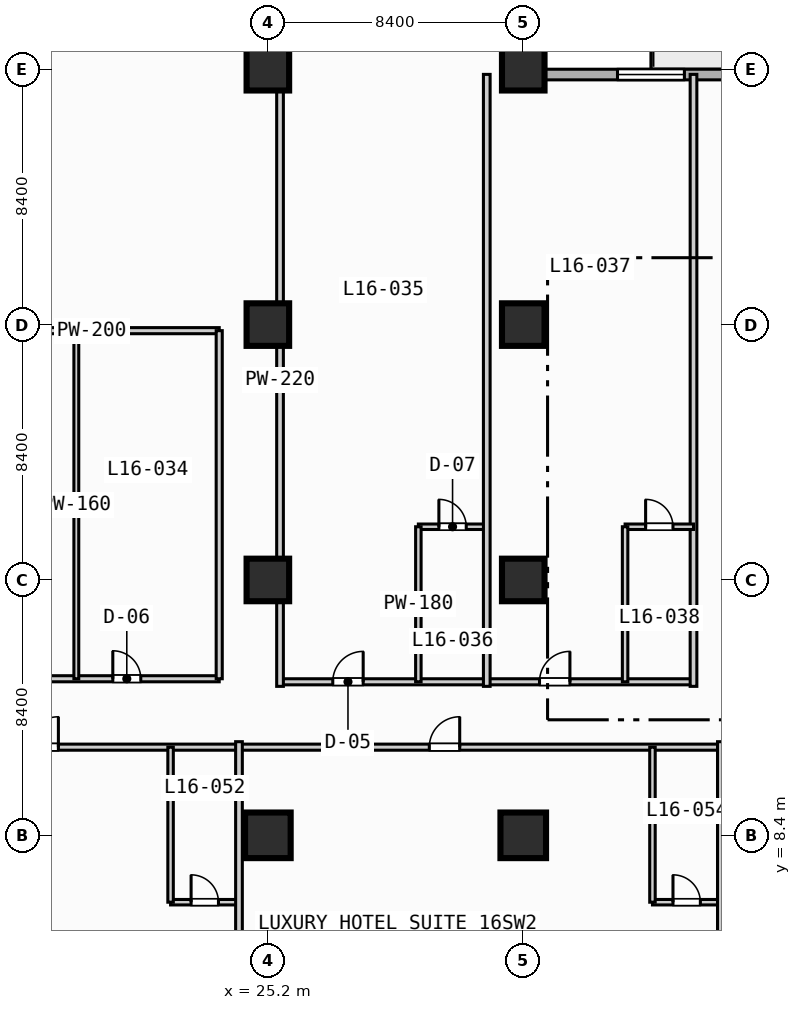
"""IFC4 building model, lengths in metres.
Left out: names, types, materials, properties, quantities, classifications, styles, units other than length and angle.
Written with IfcOpenShell. Run it as: python <this file> out.ifc"""

import sys

from ifc_helpers import new_model, si_unit, direction, frame, frame_2d, origin, origin_2d, place, context, subcontext, project, spatial, rectangle, extrude, element, fill, save


model = new_model("IFC4")
c1 = context("Model", 3, precision=1e-05, world=origin(), true_north=direction((0.0, 1.0)))
c2 = subcontext(c1, "Body", "Model", "MODEL_VIEW")
j1 = project(units=[si_unit("LENGTHUNIT", "METRE"), si_unit("PLANEANGLEUNIT", "RADIAN")], contexts=[c1])
p1 = place(None, origin())
s1 = spatial("IfcSite", under=j1, at=p1, CompositionType="ELEMENT")
p2 = place(p1, origin())
s2 = spatial("IfcBuilding", under=s1, at=p2, CompositionType="ELEMENT")
p3 = place(p2, frame((0.0, 0.0, 70.0)))
s3 = spatial("IfcBuildingStorey", under=s2, at=p3, CompositionType="ELEMENT", Elevation=70.0)
p4 = place(p3, frame((25.2, 8.4, 0.0), z_axis=(0.0, 0.0, 1.0), x_axis=(1.0, 0.0, 0.0)))
e1 = element("IfcColumn", 1, at=p4, inside=s3, PredefinedType="COLUMN", context=c2, shape_type="SweptSolid", body=[
    extrude(rectangle(XDim=1.5, YDim=1.5, at=origin_2d()), origin(), (0.0, 0.0, 1.0), 3.8),
])
for number, where, z_axis, x_axis in (
    (2, (25.2, 16.8, 0.0), (0.0, 0.0, 1.0), (1.0, 0.0, 0.0)),
    (3, (25.2, 25.2, 0.0), (0.0, 0.0, 1.0), (1.0, 0.0, 0.0)),
    (4, (25.2, 33.6, 0.0), (0.0, 0.0, 1.0), (1.0, 0.0, 0.0)),
):
    element("IfcColumn", number, at=place(p3, frame(where, z_axis=z_axis, x_axis=x_axis)), inside=s3, PredefinedType="COLUMN", context=c2, shape_type="SweptSolid", body=[
        extrude(rectangle(XDim=1.4, YDim=1.4, at=origin_2d()), origin(), (0.0, 0.0, 1.0), 3.8),
    ])
p5 = place(p3, frame((33.6, 8.4, 0.0), z_axis=(0.0, 0.0, 1.0), x_axis=(1.0, 0.0, 0.0)))
e5 = element("IfcColumn", 5, at=p5, inside=s3, PredefinedType="COLUMN", context=c2, shape_type="SweptSolid", body=[
    extrude(rectangle(XDim=1.5, YDim=1.5, at=origin_2d()), origin(), (0.0, 0.0, 1.0), 3.8),
])
for number, where, z_axis, x_axis in (
    (6, (33.6, 16.8, 0.0), (0.0, 0.0, 1.0), (1.0, 0.0, 0.0)),
    (7, (33.6, 25.2, 0.0), (0.0, 0.0, 1.0), (1.0, 0.0, 0.0)),
    (8, (33.6, 33.6, 0.0), (0.0, 0.0, 1.0), (1.0, 0.0, 0.0)),
):
    element("IfcColumn", number, at=place(p3, frame(where, z_axis=z_axis, x_axis=x_axis)), inside=s3, PredefinedType="COLUMN", context=c2, shape_type="SweptSolid", body=[
        extrude(rectangle(XDim=1.4, YDim=1.4, at=origin_2d()), origin(), (0.0, 0.0, 1.0), 3.8),
    ])
p6 = place(p3, frame((33.425, 89.225, 0.0), z_axis=(0.0, 0.0, 1.0), x_axis=(0.0, -1.0, 0.0)))
e9 = element("IfcWall", 9, at=p6, inside=s3, PredefinedType="STANDARD", context=c2, shape_type="SweptSolid", body=[
    extrude(rectangle(XDim=55.8, YDim=0.35, at=frame_2d((27.9, 0.0))), origin(), (0.0, 0.0, 1.0), 3.55),
])
p7 = place(p6, frame((16.725, 0.0, 0.85)))
e10 = element("IfcOpeningElement", 10, at=p7, cuts=e9, PredefinedType="OPENING", context=c2, shape_type="SweptSolid", body=[
    extrude(rectangle(XDim=2.2, YDim=1.8, at=frame_2d((1.1, 0.9))), frame((0.0, 0.185, 0.0), z_axis=(0.0, -1.0, 0.0), x_axis=(1.0, 0.0, 0.0)), (0.0, 0.0, 1.0), 0.37),
])
p8 = place(p6, frame((8.325, 0.0, 0.85)))
e11 = element("IfcOpeningElement", 11, at=p8, cuts=e9, PredefinedType="OPENING", context=c2, shape_type="SweptSolid", body=[
    extrude(rectangle(XDim=2.2, YDim=1.8, at=frame_2d((1.1, 0.9))), frame((0.0, 0.185, 0.0), z_axis=(0.0, -1.0, 0.0), x_axis=(1.0, 0.0, 0.0)), (0.0, 0.0, 1.0), 0.37),
])
p9 = place(p3, frame((33.425, 33.425, 0.0), z_axis=(0.0, 0.0, 1.0), x_axis=(1.0, 0.0, 0.0)))
e12 = element("IfcWall", 12, at=p9, inside=s3, PredefinedType="STANDARD", context=c2, shape_type="SweptSolid", body=[
    extrude(rectangle(XDim=55.8, YDim=0.35, at=frame_2d((27.9, 0.0))), origin(), (0.0, 0.0, 1.0), 3.55),
])
p10 = place(p9, frame((12.075, 0.0, 0.0)))
e13 = element("IfcOpeningElement", 13, at=p10, cuts=e12, PredefinedType="OPENING", context=c2, shape_type="SweptSolid", body=[
    extrude(rectangle(XDim=1.4, YDim=2.2, at=frame_2d((0.7, 1.1))), frame((0.0, 0.185, 0.0), z_axis=(0.0, -1.0, 0.0), x_axis=(1.0, 0.0, 0.0)), (0.0, 0.0, 1.0), 0.37),
])
p11 = place(p9, frame((3.275, 0.0, 0.85)))
e14 = element("IfcOpeningElement", 14, at=p11, cuts=e12, PredefinedType="OPENING", context=c2, shape_type="SweptSolid", body=[
    extrude(rectangle(XDim=2.2, YDim=1.8, at=frame_2d((1.1, 0.9))), frame((0.0, 0.185, 0.0), z_axis=(0.0, -1.0, 0.0), x_axis=(1.0, 0.0, 0.0)), (0.0, 0.0, 1.0), 0.37),
])
p12 = place(p9, frame((36.875, 0.0, 0.85)))
e15 = element("IfcOpeningElement", 15, at=p12, cuts=e12, PredefinedType="OPENING", context=c2, shape_type="SweptSolid", body=[
    extrude(rectangle(XDim=2.2, YDim=1.8, at=frame_2d((1.1, 0.9))), frame((0.0, 0.185, 0.0), z_axis=(0.0, -1.0, 0.0), x_axis=(1.0, 0.0, 0.0)), (0.0, 0.0, 1.0), 0.37),
])
p13 = place(p9, frame((45.275, 0.0, 0.85)))
e16 = element("IfcOpeningElement", 16, at=p13, cuts=e12, PredefinedType="OPENING", context=c2, shape_type="SweptSolid", body=[
    extrude(rectangle(XDim=2.2, YDim=1.8, at=frame_2d((1.1, 0.9))), frame((0.0, 0.185, 0.0), z_axis=(0.0, -1.0, 0.0), x_axis=(1.0, 0.0, 0.0)), (0.0, 0.0, 1.0), 0.37),
])
p14 = place(p3, frame((13.7, 13.55, 0.0), z_axis=(0.0, 0.0, 1.0), x_axis=(1.0, 0.0, 0.0)))
e17 = element("IfcWall", 17, at=p14, inside=s3, PredefinedType="PARTITIONING", context=c2, shape_type="SweptSolid", body=[
    extrude(rectangle(XDim=9.9, YDim=0.2, at=frame_2d((4.95, 0.0))), origin(), (0.0, 0.0, 1.0), 3.55),
])
p15 = place(p14, frame((1.2, 0.0, 0.0)))
e18 = element("IfcOpeningElement", 18, at=p15, cuts=e17, PredefinedType="OPENING", context=c2, shape_type="SweptSolid", body=[
    extrude(rectangle(XDim=0.92, YDim=2.1, at=frame_2d((0.46, 1.05))), frame((0.0, 0.11, 0.0), z_axis=(0.0, -1.0, 0.0), x_axis=(1.0, 0.0, 0.0)), (0.0, 0.0, 1.0), 0.22),
])
p16 = place(p14, frame((6.4, 0.0, 0.0)))
e19 = element("IfcOpeningElement", 19, at=p16, cuts=e17, PredefinedType="OPENING", context=c2, shape_type="SweptSolid", body=[
    extrude(rectangle(XDim=0.92, YDim=2.1, at=frame_2d((0.46, 1.05))), frame((0.0, 0.11, 0.0), z_axis=(0.0, -1.0, 0.0), x_axis=(1.0, 0.0, 0.0)), (0.0, 0.0, 1.0), 0.22),
])
p17 = place(p3, frame((18.9, 13.55, 0.0), z_axis=(0.0, 0.0, 1.0), x_axis=(0.0, 1.0, 0.0)))
e20 = element("IfcWall", 20, at=p17, inside=s3, PredefinedType="PARTITIONING", context=c2, shape_type="SweptSolid", body=[
    extrude(rectangle(XDim=11.45, YDim=0.16, at=frame_2d((5.725, 0.0))), origin(), (0.0, 0.0, 1.0), 3.55),
])
p18 = place(p3, frame((13.7, 25.0, 0.0), z_axis=(0.0, 0.0, 1.0), x_axis=(1.0, 0.0, 0.0)))
e21 = element("IfcWall", 21, at=p18, inside=s3, PredefinedType="PARTITIONING", context=c2, shape_type="SweptSolid", body=[
    extrude(rectangle(XDim=9.9, YDim=0.2, at=frame_2d((4.95, 0.0))), origin(), (0.0, 0.0, 1.0), 2.8),
])
p19 = place(p3, frame((23.6, 13.55, 0.0), z_axis=(0.0, 0.0, 1.0), x_axis=(0.0, 1.0, 0.0)))
e22 = element("IfcWall", 22, at=p19, inside=s3, PredefinedType="PARTITIONING", context=c2, shape_type="SweptSolid", body=[
    extrude(rectangle(XDim=11.45, YDim=0.2, at=frame_2d((5.725, 0.0))), origin(), (0.0, 0.0, 1.0), 3.55),
])
p20 = place(p3, frame((25.6, 13.45, 0.0), z_axis=(0.0, 0.0, 1.0), x_axis=(1.0, 0.0, 0.0)))
e23 = element("IfcWall", 23, at=p20, inside=s3, PredefinedType="PARTITIONING", context=c2, shape_type="SweptSolid", body=[
    extrude(rectangle(XDim=13.6, YDim=0.2, at=frame_2d((6.8, 0.0))), origin(), (0.0, 0.0, 1.0), 3.55),
])
p21 = place(p20, frame((1.735, 0.0, 0.0)))
e24 = element("IfcOpeningElement", 24, at=p21, cuts=e23, PredefinedType="OPENING", context=c2, shape_type="SweptSolid", body=[
    extrude(rectangle(XDim=1.0, YDim=2.15, at=frame_2d((0.5, 1.075))), frame((0.0, 0.11, 0.0), z_axis=(0.0, -1.0, 0.0), x_axis=(1.0, 0.0, 0.0)), (0.0, 0.0, 1.0), 0.22),
])
p22 = place(p20, frame((8.535, 0.0, 0.0)))
e25 = element("IfcOpeningElement", 25, at=p22, cuts=e23, PredefinedType="OPENING", context=c2, shape_type="SweptSolid", body=[
    extrude(rectangle(XDim=1.0, YDim=2.15, at=frame_2d((0.5, 1.075))), frame((0.0, 0.11, 0.0), z_axis=(0.0, -1.0, 0.0), x_axis=(1.0, 0.0, 0.0)), (0.0, 0.0, 1.0), 0.22),
])
p23 = place(p3, frame((25.6, 13.3, 0.0), z_axis=(0.0, 0.0, 1.0), x_axis=(0.0, 1.0, 0.0)))
e26 = element("IfcWall", 26, at=p23, inside=s3, PredefinedType="PARTITIONING", context=c2, shape_type="SweptSolid", body=[
    extrude(rectangle(XDim=20.13, YDim=0.22, at=frame_2d((10.065, 0.0))), origin(), (0.0, 0.0, 1.0), 3.55),
])
p24 = place(p3, frame((30.15, 18.55, 0.0), z_axis=(0.0, 0.0, 1.0), x_axis=(1.0, 0.0, 0.0)))
e27 = element("IfcWall", 27, at=p24, inside=s3, PredefinedType="PLUMBINGWALL", context=c2, shape_type="SweptSolid", body=[
    extrude(rectangle(XDim=2.25, YDim=0.18, at=frame_2d((1.125, 0.0))), origin(), (0.0, 0.0, 1.0), 3.55),
])
p25 = place(p24, frame((0.675, 0.0, 0.0)))
e28 = element("IfcOpeningElement", 28, at=p25, cuts=e27, PredefinedType="OPENING", context=c2, shape_type="SweptSolid", body=[
    extrude(rectangle(XDim=0.9, YDim=2.1, at=frame_2d((0.45, 1.05))), frame((0.0, 0.1, 0.0), z_axis=(0.0, -1.0, 0.0), x_axis=(1.0, 0.0, 0.0)), (0.0, 0.0, 1.0), 0.2),
])
p26 = place(p3, frame((30.15, 13.45, 0.0), z_axis=(0.0, 0.0, 1.0), x_axis=(0.0, 1.0, 0.0)))
e29 = element("IfcWall", 29, at=p26, inside=s3, PredefinedType="PLUMBINGWALL", context=c2, shape_type="SweptSolid", body=[
    extrude(rectangle(XDim=5.1, YDim=0.18, at=frame_2d((2.55, 0.0))), origin(), (0.0, 0.0, 1.0), 3.55),
])
for number, where, z_axis, x_axis in (
    (30, (32.4, 13.3, 0.0), (0.0, 0.0, 1.0), (0.0, 1.0, 0.0)),
    (31, (39.2, 13.3, 0.0), (0.0, 0.0, 1.0), (0.0, 1.0, 0.0)),
):
    element("IfcWall", number, at=place(p3, frame(where, z_axis=z_axis, x_axis=x_axis)), inside=s3, PredefinedType="PARTITIONING", context=c2, shape_type="SweptSolid", body=[
        extrude(rectangle(XDim=20.13, YDim=0.22, at=frame_2d((10.065, 0.0))), origin(), (0.0, 0.0, 1.0), 3.55),
    ])
p27 = place(p3, frame((36.95, 18.55, 0.0), z_axis=(0.0, 0.0, 1.0), x_axis=(1.0, 0.0, 0.0)))
e32 = element("IfcWall", 32, at=p27, inside=s3, PredefinedType="PLUMBINGWALL", context=c2, shape_type="SweptSolid", body=[
    extrude(rectangle(XDim=2.25, YDim=0.18, at=frame_2d((1.125, 0.0))), origin(), (0.0, 0.0, 1.0), 3.55),
])
p28 = place(p27, frame((0.675, 0.0, 0.0)))
e33 = element("IfcOpeningElement", 33, at=p28, cuts=e32, PredefinedType="OPENING", context=c2, shape_type="SweptSolid", body=[
    extrude(rectangle(XDim=0.9, YDim=2.1, at=frame_2d((0.45, 1.05))), frame((0.0, 0.1, 0.0), z_axis=(0.0, -1.0, 0.0), x_axis=(1.0, 0.0, 0.0)), (0.0, 0.0, 1.0), 0.2),
])
p29 = place(p3, frame((36.95, 13.45, 0.0), z_axis=(0.0, 0.0, 1.0), x_axis=(0.0, 1.0, 0.0)))
e34 = element("IfcWall", 34, at=p29, inside=s3, PredefinedType="PLUMBINGWALL", context=c2, shape_type="SweptSolid", body=[
    extrude(rectangle(XDim=5.1, YDim=0.18, at=frame_2d((2.55, 0.0))), origin(), (0.0, 0.0, 1.0), 3.55),
])
p30 = place(p3, frame((13.7, 11.3, 0.0), z_axis=(0.0, 0.0, 1.0), x_axis=(1.0, 0.0, 0.0)))
e35 = element("IfcWall", 35, at=p30, inside=s3, PredefinedType="PARTITIONING", context=c2, shape_type="SweptSolid", body=[
    extrude(rectangle(XDim=50.1, YDim=0.2, at=frame_2d((25.05, 0.0))), origin(), (0.0, 0.0, 1.0), 3.55),
])
p31 = place(p30, frame((3.61, 0.0, 0.0)))
e36 = element("IfcOpeningElement", 36, at=p31, cuts=e35, PredefinedType="OPENING", context=c2, shape_type="SweptSolid", body=[
    extrude(rectangle(XDim=1.0, YDim=2.15, at=frame_2d((0.5, 1.075))), frame((0.0, 0.11, 0.0), z_axis=(0.0, -1.0, 0.0), x_axis=(1.0, 0.0, 0.0)), (0.0, 0.0, 1.0), 0.22),
])
p32 = place(p30, frame((16.81, 0.0, 0.0)))
e37 = element("IfcOpeningElement", 37, at=p32, cuts=e35, PredefinedType="OPENING", context=c2, shape_type="SweptSolid", body=[
    extrude(rectangle(XDim=1.0, YDim=2.15, at=frame_2d((0.5, 1.075))), frame((0.0, 0.11, 0.0), z_axis=(0.0, -1.0, 0.0), x_axis=(1.0, 0.0, 0.0)), (0.0, 0.0, 1.0), 0.22),
])
p33 = place(p30, frame((31.935, 0.0, 0.0)))
e38 = element("IfcOpeningElement", 38, at=p33, cuts=e35, PredefinedType="OPENING", context=c2, shape_type="SweptSolid", body=[
    extrude(rectangle(XDim=1.0, YDim=2.15, at=frame_2d((0.5, 1.075))), frame((0.0, 0.11, 0.0), z_axis=(0.0, -1.0, 0.0), x_axis=(1.0, 0.0, 0.0)), (0.0, 0.0, 1.0), 0.22),
])
p34 = place(p30, frame((43.785, 0.0, 0.0)))
e39 = element("IfcOpeningElement", 39, at=p34, cuts=e35, PredefinedType="OPENING", context=c2, shape_type="SweptSolid", body=[
    extrude(rectangle(XDim=1.0, YDim=2.15, at=frame_2d((0.5, 1.075))), frame((0.0, 0.11, 0.0), z_axis=(0.0, -1.0, 0.0), x_axis=(1.0, 0.0, 0.0)), (0.0, 0.0, 1.0), 0.22),
])
p35 = place(p3, frame((22.0, 6.2, 0.0), z_axis=(0.0, 0.0, 1.0), x_axis=(1.0, 0.0, 0.0)))
e40 = element("IfcWall", 40, at=p35, inside=s3, PredefinedType="PLUMBINGWALL", context=c2, shape_type="SweptSolid", body=[
    extrude(rectangle(XDim=2.25, YDim=0.18, at=frame_2d((1.125, 0.0))), origin(), (0.0, 0.0, 1.0), 3.55),
])
p36 = place(p35, frame((0.675, 0.0, 0.0)))
e41 = element("IfcOpeningElement", 41, at=p36, cuts=e40, PredefinedType="OPENING", context=c2, shape_type="SweptSolid", body=[
    extrude(rectangle(XDim=0.9, YDim=2.1, at=frame_2d((0.45, 1.05))), frame((0.0, 0.1, 0.0), z_axis=(0.0, -1.0, 0.0), x_axis=(1.0, 0.0, 0.0)), (0.0, 0.0, 1.0), 0.2),
])
p37 = place(p3, frame((22.0, 6.2, 0.0), z_axis=(0.0, 0.0, 1.0), x_axis=(0.0, 1.0, 0.0)))
e42 = element("IfcWall", 42, at=p37, inside=s3, PredefinedType="PLUMBINGWALL", context=c2, shape_type="SweptSolid", body=[
    extrude(rectangle(XDim=5.1, YDim=0.18, at=frame_2d((2.55, 0.0))), origin(), (0.0, 0.0, 1.0), 3.55),
])
p38 = place(p3, frame((24.25, 0.2, 0.0), z_axis=(0.0, 0.0, 1.0), x_axis=(0.0, 1.0, 0.0)))
e43 = element("IfcWall", 43, at=p38, inside=s3, PredefinedType="PARTITIONING", context=c2, shape_type="SweptSolid", body=[
    extrude(rectangle(XDim=11.28, YDim=0.22, at=frame_2d((5.64, 0.0))), origin(), (0.0, 0.0, 1.0), 3.55),
])
p39 = place(p3, frame((37.85, 6.2, 0.0), z_axis=(0.0, 0.0, 1.0), x_axis=(1.0, 0.0, 0.0)))
e44 = element("IfcWall", 44, at=p39, inside=s3, PredefinedType="PLUMBINGWALL", context=c2, shape_type="SweptSolid", body=[
    extrude(rectangle(XDim=2.25, YDim=0.18, at=frame_2d((1.125, 0.0))), origin(), (0.0, 0.0, 1.0), 3.55),
])
p40 = place(p39, frame((0.675, 0.0, 0.0)))
e45 = element("IfcOpeningElement", 45, at=p40, cuts=e44, PredefinedType="OPENING", context=c2, shape_type="SweptSolid", body=[
    extrude(rectangle(XDim=0.9, YDim=2.1, at=frame_2d((0.45, 1.05))), frame((0.0, 0.1, 0.0), z_axis=(0.0, -1.0, 0.0), x_axis=(1.0, 0.0, 0.0)), (0.0, 0.0, 1.0), 0.2),
])
p41 = place(p3, frame((37.85, 6.2, 0.0), z_axis=(0.0, 0.0, 1.0), x_axis=(0.0, 1.0, 0.0)))
e46 = element("IfcWall", 46, at=p41, inside=s3, PredefinedType="PLUMBINGWALL", context=c2, shape_type="SweptSolid", body=[
    extrude(rectangle(XDim=5.1, YDim=0.18, at=frame_2d((2.55, 0.0))), origin(), (0.0, 0.0, 1.0), 3.55),
])
p42 = place(p3, frame((40.1, 0.2, 0.0), z_axis=(0.0, 0.0, 1.0), x_axis=(0.0, 1.0, 0.0)))
e47 = element("IfcWall", 47, at=p42, inside=s3, PredefinedType="PARTITIONING", context=c2, shape_type="SweptSolid", body=[
    extrude(rectangle(XDim=11.28, YDim=0.22, at=frame_2d((5.64, 0.0))), origin(), (0.0, 0.0, 1.0), 3.55),
])
p43 = place(p11, origin())
e48 = element("IfcWindow", 48, at=p43, inside=s3, PartitioningType="SINGLE_PANEL", PredefinedType="WINDOW", context=c2, shape_type="SweptSolid", body=[
    extrude(rectangle(XDim=2.2, YDim=1.8, at=frame_2d((1.1, 0.9))), frame((0.0, 0.03, 0.0), z_axis=(0.0, -1.0, 0.0), x_axis=(1.0, 0.0, 0.0)), (0.0, 0.0, 1.0), 0.06),
])
fill(e14, e48)
p44 = place(p16, origin())
e49 = element("IfcDoor", 49, at=p44, inside=s3, OperationType="SINGLE_SWING_LEFT", PredefinedType="DOOR", context=c2, shape_type="SweptSolid", body=[
    extrude(rectangle(XDim=0.92, YDim=2.1, at=frame_2d((0.46, 1.05))), frame((0.0, 0.025, 0.0), z_axis=(0.0, -1.0, 0.0), x_axis=(1.0, 0.0, 0.0)), (0.0, 0.0, 1.0), 0.05),
])
fill(e19, e49)
p45 = place(p21, origin())
e50 = element("IfcDoor", 50, at=p45, inside=s3, OperationType="SINGLE_SWING_RIGHT", PredefinedType="DOOR", context=c2, shape_type="SweptSolid", body=[
    extrude(rectangle(XDim=1.0, YDim=2.15, at=frame_2d((0.5, 1.075))), frame((0.0, 0.025, 0.0), z_axis=(0.0, -1.0, 0.0), x_axis=(1.0, 0.0, 0.0)), (0.0, 0.0, 1.0), 0.05),
])
fill(e24, e50)
p46 = place(p22, origin())
e51 = element("IfcDoor", 51, at=p46, inside=s3, OperationType="SINGLE_SWING_RIGHT", PredefinedType="DOOR", context=c2, shape_type="SweptSolid", body=[
    extrude(rectangle(XDim=1.0, YDim=2.15, at=frame_2d((0.5, 1.075))), frame((0.0, 0.025, 0.0), z_axis=(0.0, -1.0, 0.0), x_axis=(1.0, 0.0, 0.0)), (0.0, 0.0, 1.0), 0.05),
])
fill(e25, e51)
p47 = place(p25, origin())
e52 = element("IfcDoor", 52, at=p47, inside=s3, OperationType="SINGLE_SWING_LEFT", PredefinedType="DOOR", context=c2, shape_type="SweptSolid", body=[
    extrude(rectangle(XDim=0.9, YDim=2.1, at=frame_2d((0.45, 1.05))), frame((0.0, 0.025, 0.0), z_axis=(0.0, -1.0, 0.0), x_axis=(1.0, 0.0, 0.0)), (0.0, 0.0, 1.0), 0.05),
])
fill(e28, e52)
p48 = place(p28, origin())
e53 = element("IfcDoor", 53, at=p48, inside=s3, OperationType="SINGLE_SWING_LEFT", PredefinedType="DOOR", context=c2, shape_type="SweptSolid", body=[
    extrude(rectangle(XDim=0.9, YDim=2.1, at=frame_2d((0.45, 1.05))), frame((0.0, 0.025, 0.0), z_axis=(0.0, -1.0, 0.0), x_axis=(1.0, 0.0, 0.0)), (0.0, 0.0, 1.0), 0.05),
])
fill(e33, e53)
p49 = place(p31, origin())
e54 = element("IfcDoor", 54, at=p49, inside=s3, OperationType="SINGLE_SWING_RIGHT", PredefinedType="DOOR", context=c2, shape_type="SweptSolid", body=[
    extrude(rectangle(XDim=1.0, YDim=2.15, at=frame_2d((0.5, 1.075))), frame((0.0, 0.025, 0.0), z_axis=(0.0, -1.0, 0.0), x_axis=(1.0, 0.0, 0.0)), (0.0, 0.0, 1.0), 0.05),
])
fill(e36, e54)
p50 = place(p32, origin())
e55 = element("IfcDoor", 55, at=p50, inside=s3, OperationType="SINGLE_SWING_RIGHT", PredefinedType="DOOR", context=c2, shape_type="SweptSolid", body=[
    extrude(rectangle(XDim=1.0, YDim=2.15, at=frame_2d((0.5, 1.075))), frame((0.0, 0.025, 0.0), z_axis=(0.0, -1.0, 0.0), x_axis=(1.0, 0.0, 0.0)), (0.0, 0.0, 1.0), 0.05),
])
fill(e37, e55)
p51 = place(p36, origin())
e56 = element("IfcDoor", 56, at=p51, inside=s3, OperationType="SINGLE_SWING_LEFT", PredefinedType="DOOR", context=c2, shape_type="SweptSolid", body=[
    extrude(rectangle(XDim=0.9, YDim=2.1, at=frame_2d((0.45, 1.05))), frame((0.0, 0.025, 0.0), z_axis=(0.0, -1.0, 0.0), x_axis=(1.0, 0.0, 0.0)), (0.0, 0.0, 1.0), 0.05),
])
fill(e41, e56)
p52 = place(p40, origin())
e57 = element("IfcDoor", 57, at=p52, inside=s3, OperationType="SINGLE_SWING_LEFT", PredefinedType="DOOR", context=c2, shape_type="SweptSolid", body=[
    extrude(rectangle(XDim=0.9, YDim=2.1, at=frame_2d((0.45, 1.05))), frame((0.0, 0.025, 0.0), z_axis=(0.0, -1.0, 0.0), x_axis=(1.0, 0.0, 0.0)), (0.0, 0.0, 1.0), 0.05),
])
fill(e45, e57)
save(model, sys.argv[1])
